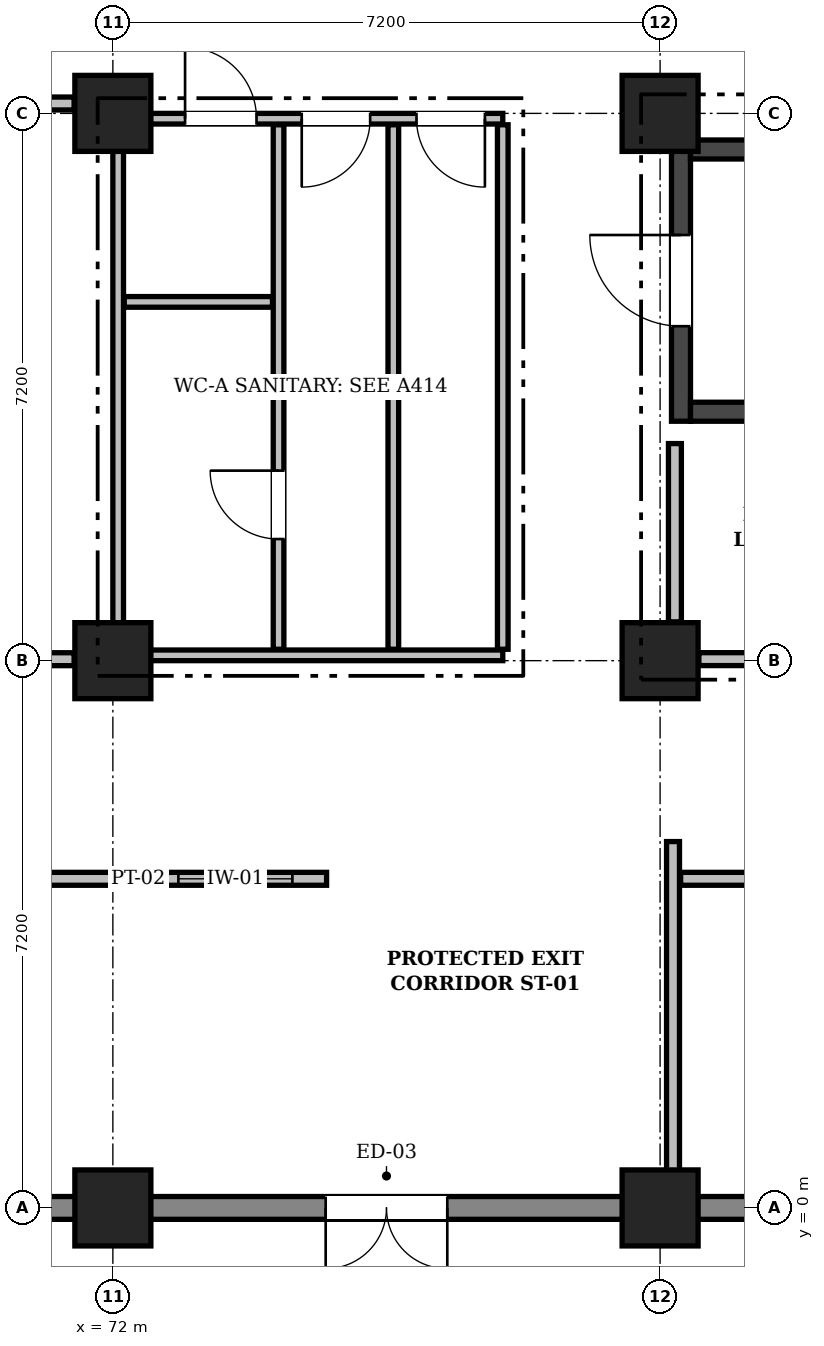
"""IFC4 building model, lengths in metres.
Left out: names, types, materials, properties, quantities, classifications, styles, units other than length and angle.
Written with IfcOpenShell. Run it as: python <this file> out.ifc"""

import sys

from ifc_helpers import new_model, si_unit, direction, frame, frame_2d, origin, origin_2d, place, context, subcontext, project, spatial, rectangle, extrude, element, fill, save


model = new_model("IFC4")
c1 = context("Model", 3, precision=1e-05, world=origin(), true_north=direction((0.0, 1.0)))
c2 = subcontext(c1, "Body", "Model", "MODEL_VIEW")
j1 = project(units=[si_unit("LENGTHUNIT", "METRE"), si_unit("PLANEANGLEUNIT", "RADIAN")], contexts=[c1])
p1 = place(None, origin())
s1 = spatial("IfcSite", under=j1, at=p1, CompositionType="ELEMENT")
p2 = place(p1, origin())
s2 = spatial("IfcBuilding", under=s1, at=p2, CompositionType="ELEMENT")
p3 = place(p2, origin())
s3 = spatial("IfcBuildingStorey", under=s2, at=p3, CompositionType="ELEMENT", Elevation=0.0)
for number, where, z_axis, x_axis in (
    (1, (72.0, 0.0, 0.0), (0.0, 0.0, 1.0), (1.0, 0.0, 0.0)),
    (2, (72.0, 7.2, 0.0), (0.0, 0.0, 1.0), (1.0, 0.0, 0.0)),
    (3, (72.0, 14.4, 0.0), (0.0, 0.0, 1.0), (1.0, 0.0, 0.0)),
    (4, (79.2, 0.0, 0.0), (0.0, 0.0, 1.0), (1.0, 0.0, 0.0)),
    (5, (79.2, 7.2, 0.0), (0.0, 0.0, 1.0), (1.0, 0.0, 0.0)),
    (6, (79.2, 14.4, 0.0), (0.0, 0.0, 1.0), (1.0, 0.0, 0.0)),
):
    element("IfcColumn", number, at=place(p3, frame(where, z_axis=z_axis, x_axis=x_axis)), inside=s3, PredefinedType="COLUMN", context=c2, shape_type="SweptSolid", body=[
        extrude(rectangle(XDim=1.0, YDim=1.0, at=origin_2d()), origin(), (0.0, 0.0, 1.0), 4.8),
    ])
p4 = place(p3, frame((86.4, 0.0, 0.0), z_axis=(0.0, 0.0, 1.0), x_axis=(-1.0, 0.0, 0.0)))
e7 = element("IfcWall", 7, at=p4, inside=s3, PredefinedType="SOLIDWALL", context=c2, shape_type="SweptSolid", body=[
    extrude(rectangle(XDim=7.2, YDim=0.3, at=frame_2d((3.6, 0.0))), origin(), (0.0, 0.0, 1.0), 4.52),
])
p5 = place(p4, frame((2.05, 0.0, 0.95)))
e8 = element("IfcOpeningElement", 8, at=p5, cuts=e7, PredefinedType="OPENING", context=c2, shape_type="SweptSolid", body=[
    extrude(rectangle(XDim=3.1, YDim=1.55, at=frame_2d((1.55, 0.775))), frame((0.0, 0.162, 0.0), z_axis=(0.0, -1.0, 0.0), x_axis=(1.0, 0.0, 0.0)), (0.0, 0.0, 1.0), 0.324),
])
p6 = place(p3, frame((79.2, 0.0, 0.0), z_axis=(0.0, 0.0, 1.0), x_axis=(-1.0, 0.0, 0.0)))
e9 = element("IfcWall", 9, at=p6, inside=s3, PredefinedType="SOLIDWALL", context=c2, shape_type="SweptSolid", body=[
    extrude(rectangle(XDim=7.2, YDim=0.3, at=frame_2d((3.6, 0.0))), origin(), (0.0, 0.0, 1.0), 4.52),
])
p7 = place(p6, frame((2.8, 0.0, 0.0)))
e10 = element("IfcOpeningElement", 10, at=p7, cuts=e9, PredefinedType="OPENING", context=c2, shape_type="SweptSolid", body=[
    extrude(rectangle(XDim=1.6, YDim=2.2, at=frame_2d((0.8, 1.1))), frame((0.0, 0.162, 0.0), z_axis=(0.0, -1.0, 0.0), x_axis=(1.0, 0.0, 0.0)), (0.0, 0.0, 1.0), 0.324),
])
p8 = place(p3, frame((72.0, 0.0, 0.0), z_axis=(0.0, 0.0, 1.0), x_axis=(-1.0, 0.0, 0.0)))
e11 = element("IfcWall", 11, at=p8, inside=s3, PredefinedType="SOLIDWALL", context=c2, shape_type="SweptSolid", body=[
    extrude(rectangle(XDim=7.2, YDim=0.3, at=frame_2d((3.6, 0.0))), origin(), (0.0, 0.0, 1.0), 4.52),
])
p9 = place(p8, frame((1.925, 0.0, 0.95)))
e12 = element("IfcOpeningElement", 12, at=p9, cuts=e11, PredefinedType="OPENING", context=c2, shape_type="SweptSolid", body=[
    extrude(rectangle(XDim=3.35, YDim=1.55, at=frame_2d((1.675, 0.775))), frame((0.0, 0.162, 0.0), z_axis=(0.0, -1.0, 0.0), x_axis=(1.0, 0.0, 0.0)), (0.0, 0.0, 1.0), 0.324),
])
p10 = place(p3, frame((79.475, 10.35, 0.0), z_axis=(0.0, 0.0, 1.0), x_axis=(0.0, 1.0, 0.0)))
e13 = element("IfcWall", 13, at=p10, inside=s3, PredefinedType="SHEAR", context=c2, shape_type="SweptSolid", body=[
    extrude(rectangle(XDim=3.7, YDim=0.25, at=frame_2d((1.85, 0.0))), origin(), (0.0, 0.0, 1.0), 4.55),
])
p11 = place(p10, frame((1.25, 0.0, 0.0)))
e14 = element("IfcOpeningElement", 14, at=p11, cuts=e13, PredefinedType="OPENING", context=c2, shape_type="SweptSolid", body=[
    extrude(rectangle(XDim=1.2, YDim=2.15, at=frame_2d((0.6, 1.075))), frame((0.0, 0.137, 0.0), z_axis=(0.0, -1.0, 0.0), x_axis=(1.0, 0.0, 0.0)), (0.0, 0.0, 1.0), 0.274),
])
for number, where, z_axis, x_axis in (
    (15, (79.6, 10.475, 0.0), (0.0, 0.0, 1.0), (1.0, 0.0, 0.0)),
    (16, (79.6, 13.925, 0.0), (0.0, 0.0, 1.0), (1.0, 0.0, 0.0)),
):
    element("IfcWall", number, at=place(p3, frame(where, z_axis=z_axis, x_axis=x_axis)), inside=s3, PredefinedType="SHEAR", context=c2, shape_type="SweptSolid", body=[
        extrude(rectangle(XDim=7.6, YDim=0.25, at=frame_2d((3.8, 0.0))), origin(), (0.0, 0.0, 1.0), 4.55),
    ])
p12 = place(p3, frame((72.07, 7.27, 0.0), z_axis=(0.0, 0.0, 1.0), x_axis=(1.0, 0.0, 0.0)))
e17 = element("IfcWall", 17, at=p12, inside=s3, PredefinedType="PARTITIONING", context=c2, shape_type="SweptSolid", body=[
    extrude(rectangle(XDim=5.06, YDim=0.14, at=frame_2d((2.53, 0.0))), origin(), (0.0, 0.0, 1.0), 3.83),
])
p13 = place(p3, frame((72.07, 14.33, 0.0), z_axis=(0.0, 0.0, 1.0), x_axis=(1.0, 0.0, 0.0)))
e18 = element("IfcWall", 18, at=p13, inside=s3, PredefinedType="PARTITIONING", context=c2, shape_type="SweptSolid", body=[
    extrude(rectangle(XDim=5.06, YDim=0.14, at=frame_2d((2.53, 0.0))), origin(), (0.0, 0.0, 1.0), 3.83),
])
p14 = place(p13, frame((0.88, 0.0, 0.0)))
e19 = element("IfcOpeningElement", 19, at=p14, cuts=e18, PredefinedType="OPENING", context=c2, shape_type="SweptSolid", body=[
    extrude(rectangle(XDim=0.94, YDim=2.1, at=frame_2d((0.47, 1.05))), frame((0.0, 0.082, 0.0), z_axis=(0.0, -1.0, 0.0), x_axis=(1.0, 0.0, 0.0)), (0.0, 0.0, 1.0), 0.164),
])
p15 = place(p13, frame((2.415, 0.0, 0.0)))
e20 = element("IfcOpeningElement", 20, at=p15, cuts=e18, PredefinedType="OPENING", context=c2, shape_type="SweptSolid", body=[
    extrude(rectangle(XDim=0.9, YDim=2.08, at=frame_2d((0.45, 1.04))), frame((0.0, 0.082, 0.0), z_axis=(0.0, -1.0, 0.0), x_axis=(1.0, 0.0, 0.0)), (0.0, 0.0, 1.0), 0.164),
])
p16 = place(p13, frame((3.925, 0.0, 0.0)))
e21 = element("IfcOpeningElement", 21, at=p16, cuts=e18, PredefinedType="OPENING", context=c2, shape_type="SweptSolid", body=[
    extrude(rectangle(XDim=0.9, YDim=2.08, at=frame_2d((0.45, 1.04))), frame((0.0, 0.082, 0.0), z_axis=(0.0, -1.0, 0.0), x_axis=(1.0, 0.0, 0.0)), (0.0, 0.0, 1.0), 0.164),
])
p17 = place(p3, frame((72.07, 7.35, 0.0), z_axis=(0.0, 0.0, 1.0), x_axis=(0.0, 1.0, 0.0)))
e22 = element("IfcWall", 22, at=p17, inside=s3, PredefinedType="PARTITIONING", context=c2, shape_type="SweptSolid", body=[
    extrude(rectangle(XDim=6.9, YDim=0.14, at=frame_2d((3.45, 0.0))), origin(), (0.0, 0.0, 1.0), 4.08),
])
p18 = place(p3, frame((77.13, 7.35, 0.0), z_axis=(0.0, 0.0, 1.0), x_axis=(0.0, 1.0, 0.0)))
e23 = element("IfcWall", 23, at=p18, inside=s3, PredefinedType="PARTITIONING", context=c2, shape_type="SweptSolid", body=[
    extrude(rectangle(XDim=6.9, YDim=0.14, at=frame_2d((3.45, 0.0))), origin(), (0.0, 0.0, 1.0), 4.46),
])
p19 = place(p3, frame((74.18, 7.35, 0.0), z_axis=(0.0, 0.0, 1.0), x_axis=(0.0, 1.0, 0.0)))
e24 = element("IfcWall", 24, at=p19, inside=s3, PredefinedType="PARTITIONING", context=c2, shape_type="SweptSolid", body=[
    extrude(rectangle(XDim=6.9, YDim=0.14, at=frame_2d((3.45, 0.0))), origin(), (0.0, 0.0, 1.0), 4.46),
])
p20 = place(p19, frame((1.45, 0.0, 0.0)))
e25 = element("IfcOpeningElement", 25, at=p20, cuts=e24, PredefinedType="OPENING", context=c2, shape_type="SweptSolid", body=[
    extrude(rectangle(XDim=0.9, YDim=2.08, at=frame_2d((0.45, 1.04))), frame((0.0, 0.082, 0.0), z_axis=(0.0, -1.0, 0.0), x_axis=(1.0, 0.0, 0.0)), (0.0, 0.0, 1.0), 0.164),
])
p21 = place(p3, frame((75.69, 7.35, 0.0), z_axis=(0.0, 0.0, 1.0), x_axis=(0.0, 1.0, 0.0)))
e26 = element("IfcWall", 26, at=p21, inside=s3, PredefinedType="PARTITIONING", context=c2, shape_type="SweptSolid", body=[
    extrude(rectangle(XDim=6.9, YDim=0.14, at=frame_2d((3.45, 0.0))), origin(), (0.0, 0.0, 1.0), 4.46),
])
p22 = place(p3, frame((72.15, 11.92, 0.0), z_axis=(0.0, 0.0, 1.0), x_axis=(1.0, 0.0, 0.0)))
e27 = element("IfcWall", 27, at=p22, inside=s3, PredefinedType="PARTITIONING", context=c2, shape_type="SweptSolid", body=[
    extrude(rectangle(XDim=1.95, YDim=0.14, at=frame_2d((0.975, 0.0))), origin(), (0.0, 0.0, 1.0), 4.46),
])
p23 = place(p3, frame((79.37, 0.162, 0.0), z_axis=(0.0, 0.0, 1.0), x_axis=(0.0, 1.0, 0.0)))
e28 = element("IfcWall", 28, at=p23, inside=s3, PredefinedType="PARTITIONING", context=c2, shape_type="SweptSolid", body=[
    extrude(rectangle(XDim=4.658, YDim=0.17, at=frame_2d((2.329, 0.0))), origin(), (0.0, 0.0, 1.0), 4.08),
])
p24 = place(p3, frame((79.395, 7.71, 0.0), z_axis=(0.0, 0.0, 1.0), x_axis=(0.0, 1.0, 0.0)))
e29 = element("IfcWall", 29, at=p24, inside=s3, PredefinedType="PARTITIONING", context=c2, shape_type="SweptSolid", body=[
    extrude(rectangle(XDim=2.346, YDim=0.17, at=frame_2d((1.173, 0.0))), origin(), (0.0, 0.0, 1.0), 4.08),
])
p25 = place(p3, frame((58.11, 14.53, 0.0), z_axis=(0.0, 0.0, 1.0), x_axis=(1.0, 0.0, 0.0)))
e30 = element("IfcWall", 30, at=p25, inside=s3, PredefinedType="PARTITIONING", context=c2, shape_type="SweptSolid", body=[
    extrude(rectangle(XDim=13.38, YDim=0.17, at=frame_2d((6.69, 0.0))), origin(), (0.0, 0.0, 1.0), 3.63),
])
p26 = place(p25, frame((6.2, 0.0, 0.0)))
e31 = element("IfcOpeningElement", 31, at=p26, cuts=e30, PredefinedType="OPENING", context=c2, shape_type="SweptSolid", body=[
    extrude(rectangle(XDim=0.98, YDim=2.14, at=frame_2d((0.49, 1.07))), frame((0.0, 0.097, 0.0), z_axis=(0.0, -1.0, 0.0), x_axis=(1.0, 0.0, 0.0)), (0.0, 0.0, 1.0), 0.194),
])
p27 = place(p3, frame((79.47, 4.33, 0.0), z_axis=(0.0, 0.0, 1.0), x_axis=(1.0, 0.0, 0.0)))
e32 = element("IfcWall", 32, at=p27, inside=s3, PredefinedType="PARTITIONING", context=c2, shape_type="SweptSolid", body=[
    extrude(rectangle(XDim=14.16, YDim=0.17, at=frame_2d((7.08, 0.0))), origin(), (0.0, 0.0, 1.0), 4.46),
])
p28 = place(p27, frame((7.06, 0.0, 0.0)))
e33 = element("IfcOpeningElement", 33, at=p28, cuts=e32, PredefinedType="OPENING", context=c2, shape_type="SweptSolid", body=[
    extrude(rectangle(XDim=2.04, YDim=2.34, at=frame_2d((1.02, 1.17))), frame((0.0, 0.097, 0.0), z_axis=(0.0, -1.0, 0.0), x_axis=(1.0, 0.0, 0.0)), (0.0, 0.0, 1.0), 0.194),
])
p29 = place(p3, frame((79.71, 7.22, 0.0), z_axis=(0.0, 0.0, 1.0), x_axis=(1.0, 0.0, 0.0)))
e34 = element("IfcWall", 34, at=p29, inside=s3, PredefinedType="PARTITIONING", context=c2, shape_type="SweptSolid", body=[
    extrude(rectangle(XDim=6.18, YDim=0.17, at=frame_2d((3.09, 0.0))), origin(), (0.0, 0.0, 1.0), 3.83),
])
p30 = place(p29, frame((2.57, 0.0, 0.0)))
e35 = element("IfcOpeningElement", 35, at=p30, cuts=e34, PredefinedType="OPENING", context=c2, shape_type="SweptSolid", body=[
    extrude(rectangle(XDim=1.04, YDim=2.18, at=frame_2d((0.52, 1.09))), frame((0.0, 0.097, 0.0), z_axis=(0.0, -1.0, 0.0), x_axis=(1.0, 0.0, 0.0)), (0.0, 0.0, 1.0), 0.194),
])
p31 = place(p3, frame((61.76, 4.33, 0.0), z_axis=(0.0, 0.0, 1.0), x_axis=(1.0, 0.0, 0.0)))
e36 = element("IfcWall", 36, at=p31, inside=s3, PredefinedType="PARTITIONING", context=c2, shape_type="SweptSolid", body=[
    extrude(rectangle(XDim=13.052, YDim=0.17, at=frame_2d((6.526, 0.0))), origin(), (0.0, 0.0, 1.0), 4.46),
])
p32 = place(p31, frame((5.606, 0.0, 0.0)))
e37 = element("IfcOpeningElement", 37, at=p32, cuts=e36, PredefinedType="OPENING", context=c2, shape_type="SweptSolid", body=[
    extrude(rectangle(XDim=1.84, YDim=2.3, at=frame_2d((0.92, 1.15))), frame((0.0, 0.097, 0.0), z_axis=(0.0, -1.0, 0.0), x_axis=(1.0, 0.0, 0.0)), (0.0, 0.0, 1.0), 0.194),
])
p33 = place(p31, frame((11.102, 0.0, 1.05)))
e38 = element("IfcOpeningElement", 38, at=p33, cuts=e36, PredefinedType="OPENING", context=c2, shape_type="SweptSolid", body=[
    extrude(rectangle(XDim=1.5, YDim=1.05, at=frame_2d((0.75, 0.525))), frame((0.0, 0.097, 0.0), z_axis=(0.0, -1.0, 0.0), x_axis=(1.0, 0.0, 0.0)), (0.0, 0.0, 1.0), 0.194),
])
p34 = place(p3, frame((65.31, 7.219, 0.0), z_axis=(0.0, 0.0, 1.0), x_axis=(1.0, 0.0, 0.0)))
e39 = element("IfcWall", 39, at=p34, inside=s3, PredefinedType="PARTITIONING", context=c2, shape_type="SweptSolid", body=[
    extrude(rectangle(XDim=6.18, YDim=0.17, at=frame_2d((3.09, 0.0))), origin(), (0.0, 0.0, 1.0), 3.83),
])
p35 = place(p7, origin())
e40 = element("IfcDoor", 40, at=p35, inside=s3, OperationType="DOUBLE_DOOR_SINGLE_SWING", PredefinedType="DOOR", context=c2, shape_type="SweptSolid", body=[
    extrude(rectangle(XDim=1.6, YDim=2.2, at=frame_2d((0.8, 1.1))), frame((0.0, 0.025, 0.0), z_axis=(0.0, -1.0, 0.0), x_axis=(1.0, 0.0, 0.0)), (0.0, 0.0, 1.0), 0.05),
])
fill(e10, e40)
p36 = place(p11, origin())
e41 = element("IfcDoor", 41, at=p36, inside=s3, OperationType="SINGLE_SWING_RIGHT", PredefinedType="DOOR", context=c2, shape_type="SweptSolid", body=[
    extrude(rectangle(XDim=1.2, YDim=2.15, at=frame_2d((0.6, 1.075))), frame((0.0, 0.025, 0.0), z_axis=(0.0, -1.0, 0.0), x_axis=(1.0, 0.0, 0.0)), (0.0, 0.0, 1.0), 0.05),
])
fill(e14, e41)
p37 = place(p14, origin())
e42 = element("IfcDoor", 42, at=p37, inside=s3, OperationType="SINGLE_SWING_LEFT", PredefinedType="DOOR", context=c2, shape_type="SweptSolid", body=[
    extrude(rectangle(XDim=0.94, YDim=2.1, at=frame_2d((0.47, 1.05))), frame((0.0, 0.025, 0.0), z_axis=(0.0, -1.0, 0.0), x_axis=(1.0, 0.0, 0.0)), (0.0, 0.0, 1.0), 0.05),
])
fill(e19, e42)
p38 = place(p15, frame((0.9, 0.0, 0.0), z_axis=(0.0, 0.0, 1.0), x_axis=(-1.0, 0.0, 0.0)))
e43 = element("IfcDoor", 43, at=p38, inside=s3, OperationType="SINGLE_SWING_RIGHT", PredefinedType="DOOR", context=c2, shape_type="SweptSolid", body=[
    extrude(rectangle(XDim=0.9, YDim=2.08, at=frame_2d((0.45, 1.04))), frame((0.0, 0.025, 0.0), z_axis=(0.0, -1.0, 0.0), x_axis=(1.0, 0.0, 0.0)), (0.0, 0.0, 1.0), 0.05),
])
fill(e20, e43)
p39 = place(p16, frame((0.9, 0.0, 0.0), z_axis=(0.0, 0.0, 1.0), x_axis=(-1.0, 0.0, 0.0)))
e44 = element("IfcDoor", 44, at=p39, inside=s3, OperationType="SINGLE_SWING_LEFT", PredefinedType="DOOR", context=c2, shape_type="SweptSolid", body=[
    extrude(rectangle(XDim=0.9, YDim=2.08, at=frame_2d((0.45, 1.04))), frame((0.0, 0.025, 0.0), z_axis=(0.0, -1.0, 0.0), x_axis=(1.0, 0.0, 0.0)), (0.0, 0.0, 1.0), 0.05),
])
fill(e21, e44)
p40 = place(p20, origin())
e45 = element("IfcDoor", 45, at=p40, inside=s3, OperationType="SINGLE_SWING_RIGHT", PredefinedType="DOOR", context=c2, shape_type="SweptSolid", body=[
    extrude(rectangle(XDim=0.9, YDim=2.08, at=frame_2d((0.45, 1.04))), frame((0.0, 0.025, 0.0), z_axis=(0.0, -1.0, 0.0), x_axis=(1.0, 0.0, 0.0)), (0.0, 0.0, 1.0), 0.05),
])
fill(e25, e45)
p41 = place(p33, origin())
e46 = element("IfcWindow", 46, at=p41, inside=s3, PartitioningType="SINGLE_PANEL", PredefinedType="WINDOW", context=c2, shape_type="SweptSolid", body=[
    extrude(rectangle(XDim=1.5, YDim=1.05, at=frame_2d((0.75, 0.525))), frame((0.0, 0.03, 0.0), z_axis=(0.0, -1.0, 0.0), x_axis=(1.0, 0.0, 0.0)), (0.0, 0.0, 1.0), 0.06),
])
fill(e38, e46)
save(model, sys.argv[1])
